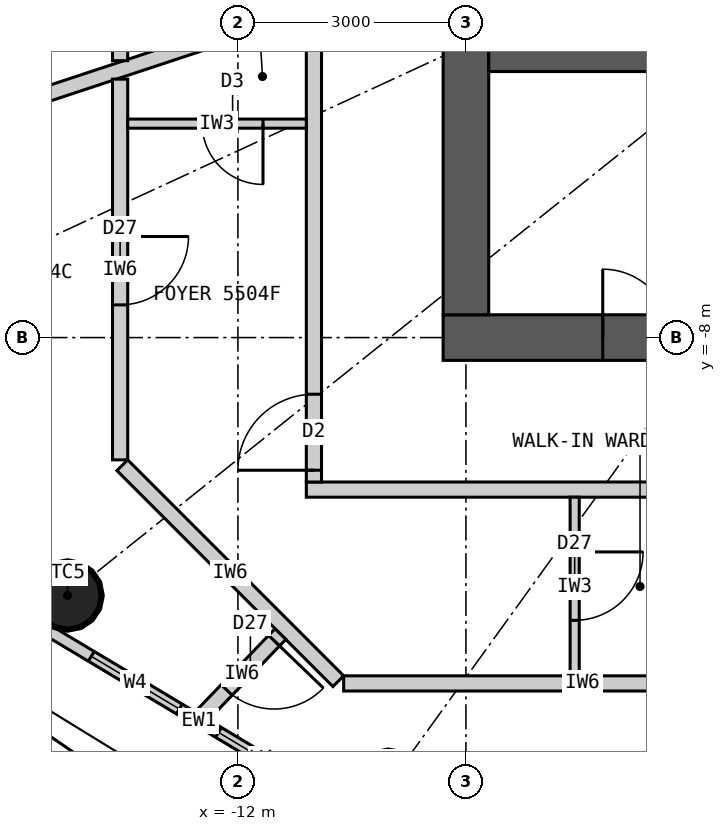
"""IFC4 building model, lengths in metres.
Left out: names, types, materials, properties, quantities, classifications, styles, units other than length and angle.
Written with IfcOpenShell. Run it as: python <this file> out.ifc"""

import sys

from ifc_helpers import new_model, si_unit, direction, frame, frame_2d, origin, origin_2d, place, context, subcontext, project, spatial, rectangle, circle, extrude, element, fill, save


model = new_model("IFC4")
c1 = context("Model", 3, precision=1e-05, world=origin(), true_north=direction((0.0, 1.0)))
c2 = subcontext(c1, "Body", "Model", "MODEL_VIEW")
j1 = project(units=[si_unit("LENGTHUNIT", "METRE"), si_unit("PLANEANGLEUNIT", "RADIAN")], contexts=[c1])
p1 = place(None, origin())
s1 = spatial("IfcSite", under=j1, at=p1, CompositionType="ELEMENT")
p2 = place(p1, origin())
s2 = spatial("IfcBuilding", under=s1, at=p2, CompositionType="ELEMENT")
p3 = place(p2, frame((0.0, 0.0, 206.1)))
s3 = spatial("IfcBuildingStorey", under=s2, at=p3, CompositionType="ELEMENT", Elevation=206.1)
for number, where, z_axis, x_axis in (
    (1, (-14.241, -11.393, 0.0), (0.0, 0.0, 1.0), (1.0, 0.0, 0.0)),
    (2, (-10.019, -13.883, 0.0), (0.0, 0.0, 1.0), (1.0, 0.0, 0.0)),
):
    element("IfcColumn", number, at=place(p3, frame(where, z_axis=z_axis, x_axis=x_axis)), inside=s3, PredefinedType="COLUMN", context=c2, shape_type="SweptSolid", body=[
        extrude(circle(Radius=0.45, at=origin_2d()), origin(), (0.0, 0.0, 1.0), 3.3),
    ])
p4 = place(p3, frame((9.3, -8.0, 0.0), z_axis=(0.0, 0.0, 1.0), x_axis=(-1.0, 0.0, 0.0)))
e3 = element("IfcWall", 3, at=p4, inside=s3, PredefinedType="SHEAR", context=c2, shape_type="SweptSolid", body=[
    extrude(rectangle(XDim=18.6, YDim=0.6, at=frame_2d((9.3, 0.0))), origin(), (0.0, 0.0, 1.0), 3.3),
])
p5 = place(p4, frame((8.0, 0.0, 0.0)))
e4 = element("IfcOpeningElement", 4, at=p5, cuts=e3, PredefinedType="OPENING", context=c2, shape_type="SweptSolid", body=[
    extrude(rectangle(XDim=1.2, YDim=2.2, at=frame_2d((0.6, 1.1))), frame((0.0, 0.31, 0.0), z_axis=(0.0, -1.0, 0.0), x_axis=(1.0, 0.0, 0.0)), (0.0, 0.0, 1.0), 0.62),
])
p6 = place(p4, frame((15.6, 0.0, 0.0)))
e5 = element("IfcOpeningElement", 5, at=p6, cuts=e3, PredefinedType="OPENING", context=c2, shape_type="SweptSolid", body=[
    extrude(rectangle(XDim=0.9, YDim=2.2, at=frame_2d((0.45, 1.1))), frame((0.0, 0.31, 0.0), z_axis=(0.0, -1.0, 0.0), x_axis=(1.0, 0.0, 0.0)), (0.0, 0.0, 1.0), 0.62),
])
p7 = place(p3, frame((-9.0, 7.7, 0.0), z_axis=(0.0, 0.0, 1.0), x_axis=(0.0, -1.0, 0.0)))
e6 = element("IfcWall", 6, at=p7, inside=s3, PredefinedType="SHEAR", context=c2, shape_type="SweptSolid", body=[
    extrude(rectangle(XDim=15.4, YDim=0.6, at=frame_2d((7.7, 0.0))), origin(), (0.0, 0.0, 1.0), 3.3),
])
p8 = place(p7, frame((6.8, 0.0, 0.0)))
e7 = element("IfcOpeningElement", 7, at=p8, cuts=e6, PredefinedType="OPENING", context=c2, shape_type="SweptSolid", body=[
    extrude(rectangle(XDim=1.8, YDim=2.2, at=frame_2d((0.9, 1.1))), frame((0.0, 0.31, 0.0), z_axis=(0.0, -1.0, 0.0), x_axis=(1.0, 0.0, 0.0)), (0.0, 0.0, 1.0), 0.62),
])
p9 = place(p3, frame((-8.7, -4.3, 0.0), z_axis=(0.0, 0.0, 1.0), x_axis=(1.0, 0.0, 0.0)))
e8 = element("IfcWall", 8, at=p9, inside=s3, PredefinedType="SHEAR", context=c2, shape_type="SweptSolid", body=[
    extrude(rectangle(XDim=17.4, YDim=0.4, at=frame_2d((8.7, 0.0))), origin(), (0.0, 0.0, 1.0), 3.3),
])
p10 = place(p3, frame((-14.68, -11.744, 0.0), z_axis=(0.0, 0.0, 1.0), x_axis=(0.85822150553, -0.513279502265, 0.0)))
e9 = element("IfcWall", 9, at=p10, inside=s3, PredefinedType="ELEMENTEDWALL", context=c2, shape_type="SweptSolid", body=[
    extrude(rectangle(XDim=5.05, YDim=0.15, at=frame_2d((2.525, 0.0))), origin(), (0.0, 0.0, 1.0), 3.12),
])
p11 = place(p10, frame((0.875, 0.0, 0.9)))
e10 = element("IfcOpeningElement", 10, at=p11, cuts=e9, PredefinedType="OPENING", context=c2, shape_type="SweptSolid", body=[
    extrude(rectangle(XDim=1.35, YDim=1.9, at=frame_2d((0.675, 0.95))), frame((0.0, 0.085, 0.0), z_axis=(0.0, -1.0, 0.0), x_axis=(1.0, 0.0, 0.0)), (0.0, 0.0, 1.0), 0.17),
])
p12 = place(p10, frame((2.825, 0.0, 0.9)))
e11 = element("IfcOpeningElement", 11, at=p12, cuts=e9, PredefinedType="OPENING", context=c2, shape_type="SweptSolid", body=[
    extrude(rectangle(XDim=1.35, YDim=1.9, at=frame_2d((0.675, 0.95))), frame((0.0, 0.085, 0.0), z_axis=(0.0, -1.0, 0.0), x_axis=(1.0, 0.0, 0.0)), (0.0, 0.0, 1.0), 0.17),
])
p13 = place(p3, frame((11.1, -10.0, 0.0), z_axis=(0.0, 0.0, 1.0), x_axis=(-1.0, 0.0, 0.0)))
e12 = element("IfcWall", 12, at=p13, inside=s3, PredefinedType="PARTITIONING", context=c2, shape_type="SweptSolid", body=[
    extrude(rectangle(XDim=22.2, YDim=0.2, at=frame_2d((11.1, 0.0))), origin(), (0.0, 0.0, 1.0), 3.12),
])
p14 = place(p13, frame((11.36, 0.0, 0.0)))
e13 = element("IfcOpeningElement", 13, at=p14, cuts=e12, PredefinedType="OPENING", context=c2, shape_type="SweptSolid", body=[
    extrude(rectangle(XDim=1.0, YDim=2.2, at=frame_2d((0.5, 1.1))), frame((0.0, 0.11, 0.0), z_axis=(0.0, -1.0, 0.0), x_axis=(1.0, 0.0, 0.0)), (0.0, 0.0, 1.0), 0.22),
])
p15 = place(p13, frame((0.595, 0.0, 0.0)))
e14 = element("IfcOpeningElement", 14, at=p15, cuts=e12, PredefinedType="OPENING", context=c2, shape_type="SweptSolid", body=[
    extrude(rectangle(XDim=1.0, YDim=2.2, at=frame_2d((0.5, 1.1))), frame((0.0, 0.11, 0.0), z_axis=(0.0, -1.0, 0.0), x_axis=(1.0, 0.0, 0.0)), (0.0, 0.0, 1.0), 0.22),
])
p16 = place(p3, frame((-11.0, 9.9, 0.0), z_axis=(0.0, 0.0, 1.0), x_axis=(0.0, -1.0, 0.0)))
e15 = element("IfcWall", 15, at=p16, inside=s3, PredefinedType="PARTITIONING", context=c2, shape_type="SweptSolid", body=[
    extrude(rectangle(XDim=19.8, YDim=0.2, at=frame_2d((9.9, 0.0))), origin(), (0.0, 0.0, 1.0), 3.12),
])
p17 = place(p16, frame((5.075, 0.0, 0.0)))
e16 = element("IfcOpeningElement", 16, at=p17, cuts=e15, PredefinedType="OPENING", context=c2, shape_type="SweptSolid", body=[
    extrude(rectangle(XDim=1.0, YDim=2.2, at=frame_2d((0.5, 1.1))), frame((0.0, 0.11, 0.0), z_axis=(0.0, -1.0, 0.0), x_axis=(1.0, 0.0, 0.0)), (0.0, 0.0, 1.0), 0.22),
])
p18 = place(p16, frame((18.645, 0.0, 0.0)))
e17 = element("IfcOpeningElement", 17, at=p18, cuts=e15, PredefinedType="OPENING", context=c2, shape_type="SweptSolid", body=[
    extrude(rectangle(XDim=1.0, YDim=2.2, at=frame_2d((0.5, 1.1))), frame((0.0, 0.11, 0.0), z_axis=(0.0, -1.0, 0.0), x_axis=(1.0, 0.0, 0.0)), (0.0, 0.0, 1.0), 0.22),
])
p19 = place(p3, frame((-11.1, -3.669, 0.0), z_axis=(0.0, 0.0, 1.0), x_axis=(-0.949476668397, -0.313837627079, 0.0)))
e18 = element("IfcWall", 18, at=p19, inside=s3, PredefinedType="PARTITIONING", context=c2, shape_type="SweptSolid", body=[
    extrude(rectangle(XDim=8.339, YDim=0.2, at=frame_2d((4.169, 0.0))), origin(), (0.0, 0.0, 1.0), 3.12),
])
p20 = place(p3, frame((-13.55, 8.139, 0.0), z_axis=(0.0, 0.0, 1.0), x_axis=(0.0, -1.0, 0.0)))
e19 = element("IfcWall", 19, at=p20, inside=s3, PredefinedType="PARTITIONING", context=c2, shape_type="SweptSolid", body=[
    extrude(rectangle(XDim=12.496, YDim=0.2, at=frame_2d((6.248, 0.0))), origin(), (0.0, 0.0, 1.0), 3.12),
])
p21 = place(p20, frame((7.031, 0.0, 0.0)))
e20 = element("IfcOpeningElement", 20, at=p21, cuts=e19, PredefinedType="OPENING", context=c2, shape_type="SweptSolid", body=[
    extrude(rectangle(XDim=0.9, YDim=2.1, at=frame_2d((0.45, 1.05))), frame((0.0, 0.11, 0.0), z_axis=(0.0, -1.0, 0.0), x_axis=(1.0, 0.0, 0.0)), (0.0, 0.0, 1.0), 0.22),
])
p22 = place(p20, frame((9.373, 0.0, 0.0)))
e21 = element("IfcOpeningElement", 21, at=p22, cuts=e19, PredefinedType="OPENING", context=c2, shape_type="SweptSolid", body=[
    extrude(rectangle(XDim=0.8, YDim=2.1, at=frame_2d((0.4, 1.05))), frame((0.0, 0.11, 0.0), z_axis=(0.0, -1.0, 0.0), x_axis=(1.0, 0.0, 0.0)), (0.0, 0.0, 1.0), 0.22),
])
p23 = place(p20, frame((3.789, 0.0, 0.0)))
e22 = element("IfcOpeningElement", 22, at=p23, cuts=e19, PredefinedType="OPENING", context=c2, shape_type="SweptSolid", body=[
    extrude(rectangle(XDim=0.9, YDim=2.1, at=frame_2d((0.45, 1.05))), frame((0.0, 0.11, 0.0), z_axis=(0.0, -1.0, 0.0), x_axis=(1.0, 0.0, 0.0)), (0.0, 0.0, 1.0), 0.22),
])
p24 = place(p3, frame((-13.55, -4.6, 0.0), z_axis=(0.0, 0.0, 1.0), x_axis=(0.0, -1.0, 0.0)))
e23 = element("IfcWall", 23, at=p24, inside=s3, PredefinedType="PARTITIONING", context=c2, shape_type="SweptSolid", body=[
    extrude(rectangle(XDim=5.009, YDim=0.2, at=frame_2d((2.504, 0.0))), origin(), (0.0, 0.0, 1.0), 3.12),
])
p25 = place(p24, frame((2.07, 0.0, 0.0)))
e24 = element("IfcOpeningElement", 24, at=p25, cuts=e23, PredefinedType="OPENING", context=c2, shape_type="SweptSolid", body=[
    extrude(rectangle(XDim=0.9, YDim=2.1, at=frame_2d((0.45, 1.05))), frame((0.0, 0.11, 0.0), z_axis=(0.0, -1.0, 0.0), x_axis=(1.0, 0.0, 0.0)), (0.0, 0.0, 1.0), 0.22),
])
p26 = place(p3, frame((-13.521, -9.679, 0.0), z_axis=(0.0, 0.0, 1.0), x_axis=(0.707106781187, -0.707106781187, 0.0)))
e25 = element("IfcWall", 25, at=p26, inside=s3, PredefinedType="PARTITIONING", context=c2, shape_type="SweptSolid", body=[
    extrude(rectangle(XDim=4.019, YDim=0.2, at=frame_2d((2.009, 0.0))), origin(), (0.0, 0.0, 1.0), 3.12),
])
p27 = place(p3, frame((-10.609, -12.55, 0.0), z_axis=(0.0, 0.0, 1.0), x_axis=(1.0, 0.0, 0.0)))
e26 = element("IfcWall", 26, at=p27, inside=s3, PredefinedType="PARTITIONING", context=c2, shape_type="SweptSolid", body=[
    extrude(rectangle(XDim=6.284, YDim=0.2, at=frame_2d((3.142, 0.0))), origin(), (0.0, 0.0, 1.0), 3.12),
])
p28 = place(p27, frame((4.944, 0.0, 0.0)))
e27 = element("IfcOpeningElement", 27, at=p28, cuts=e26, PredefinedType="OPENING", context=c2, shape_type="SweptSolid", body=[
    extrude(rectangle(XDim=0.8, YDim=2.1, at=frame_2d((0.4, 1.05))), frame((0.0, 0.11, 0.0), z_axis=(0.0, -1.0, 0.0), x_axis=(1.0, 0.0, 0.0)), (0.0, 0.0, 1.0), 0.22),
])
p29 = place(p3, frame((-11.441, -11.9, 0.0), z_axis=(0.0, 0.0, 1.0), x_axis=(-0.692958717259, -0.720977264672, 0.0)))
e28 = element("IfcWall", 28, at=p29, inside=s3, PredefinedType="PARTITIONING", context=c2, shape_type="SweptSolid", body=[
    extrude(rectangle(XDim=1.464, YDim=0.2, at=frame_2d((0.732, 0.0))), origin(), (0.0, 0.0, 1.0), 3.12),
])
p30 = place(p29, frame((0.12, 0.0, 0.0)))
e29 = element("IfcOpeningElement", 29, at=p30, cuts=e28, PredefinedType="OPENING", context=c2, shape_type="SweptSolid", body=[
    extrude(rectangle(XDim=0.9, YDim=2.1, at=frame_2d((0.45, 1.05))), frame((0.0, 0.11, 0.0), z_axis=(0.0, -1.0, 0.0), x_axis=(1.0, 0.0, 0.0)), (0.0, 0.0, 1.0), 0.22),
])
p31 = place(p3, frame((-11.1, -5.185, 0.0), z_axis=(0.0, 0.0, 1.0), x_axis=(-1.0, 0.0, 0.0)))
e30 = element("IfcWall", 30, at=p31, inside=s3, PredefinedType="PARTITIONING", context=c2, shape_type="SweptSolid", body=[
    extrude(rectangle(XDim=2.35, YDim=0.12, at=frame_2d((1.175, 0.0))), origin(), (0.0, 0.0, 1.0), 3.12),
])
p32 = place(p31, frame((0.57, 0.0, 0.0)))
e31 = element("IfcOpeningElement", 31, at=p32, cuts=e30, PredefinedType="OPENING", context=c2, shape_type="SweptSolid", body=[
    extrude(rectangle(XDim=0.8, YDim=2.1, at=frame_2d((0.4, 1.05))), frame((0.0, 0.07, 0.0), z_axis=(0.0, -1.0, 0.0), x_axis=(1.0, 0.0, 0.0)), (0.0, 0.0, 1.0), 0.14),
])
p33 = place(p3, frame((-7.569, -10.1, 0.0), z_axis=(0.0, 0.0, 1.0), x_axis=(0.0, -1.0, 0.0)))
e32 = element("IfcWall", 32, at=p33, inside=s3, PredefinedType="PARTITIONING", context=c2, shape_type="SweptSolid", body=[
    extrude(rectangle(XDim=2.35, YDim=0.12, at=frame_2d((1.175, 0.0))), origin(), (0.0, 0.0, 1.0), 3.12),
])
p34 = place(p33, frame((0.72, 0.0, 0.0)))
e33 = element("IfcOpeningElement", 33, at=p34, cuts=e32, PredefinedType="OPENING", context=c2, shape_type="SweptSolid", body=[
    extrude(rectangle(XDim=0.9, YDim=2.1, at=frame_2d((0.45, 1.05))), frame((0.0, 0.07, 0.0), z_axis=(0.0, -1.0, 0.0), x_axis=(1.0, 0.0, 0.0)), (0.0, 0.0, 1.0), 0.14),
])
p35 = place(p11, origin())
e34 = element("IfcWindow", 34, at=p35, inside=s3, PartitioningType="SINGLE_PANEL", PredefinedType="WINDOW", context=c2, shape_type="SweptSolid", body=[
    extrude(rectangle(XDim=1.35, YDim=1.9, at=frame_2d((0.675, 0.95))), frame((0.0, 0.03, 0.0), z_axis=(0.0, -1.0, 0.0), x_axis=(1.0, 0.0, 0.0)), (0.0, 0.0, 1.0), 0.06),
])
fill(e10, e34)
p36 = place(p12, origin())
e35 = element("IfcWindow", 35, at=p36, inside=s3, PartitioningType="SINGLE_PANEL", PredefinedType="WINDOW", context=c2, shape_type="SweptSolid", body=[
    extrude(rectangle(XDim=1.35, YDim=1.9, at=frame_2d((0.675, 0.95))), frame((0.0, 0.03, 0.0), z_axis=(0.0, -1.0, 0.0), x_axis=(1.0, 0.0, 0.0)), (0.0, 0.0, 1.0), 0.06),
])
fill(e11, e35)
p37 = place(p18, origin())
e36 = element("IfcDoor", 36, at=p37, inside=s3, OperationType="SINGLE_SWING_RIGHT", PredefinedType="DOOR", context=c2, shape_type="SweptSolid", body=[
    extrude(rectangle(XDim=1.0, YDim=2.2, at=frame_2d((0.5, 1.1))), frame((0.0, 0.025, 0.0), z_axis=(0.0, -1.0, 0.0), x_axis=(1.0, 0.0, 0.0)), (0.0, 0.0, 1.0), 0.05),
])
fill(e17, e36)
p38 = place(p32, origin())
e37 = element("IfcDoor", 37, at=p38, inside=s3, OperationType="SINGLE_SWING_LEFT", PredefinedType="DOOR", context=c2, shape_type="SweptSolid", body=[
    extrude(rectangle(XDim=0.8, YDim=2.1, at=frame_2d((0.4, 1.05))), frame((0.0, 0.025, 0.0), z_axis=(0.0, -1.0, 0.0), x_axis=(1.0, 0.0, 0.0)), (0.0, 0.0, 1.0), 0.05),
])
fill(e31, e37)
p39 = place(p34, origin())
e38 = element("IfcDoor", 38, at=p39, inside=s3, OperationType="SINGLE_SWING_LEFT", PredefinedType="DOOR", context=c2, shape_type="SweptSolid", body=[
    extrude(rectangle(XDim=0.9, YDim=2.1, at=frame_2d((0.45, 1.05))), frame((0.0, 0.025, 0.0), z_axis=(0.0, -1.0, 0.0), x_axis=(1.0, 0.0, 0.0)), (0.0, 0.0, 1.0), 0.05),
])
fill(e33, e38)
p40 = place(p25, origin())
e39 = element("IfcDoor", 39, at=p40, inside=s3, OperationType="SINGLE_SWING_LEFT", PredefinedType="DOOR", context=c2, shape_type="SweptSolid", body=[
    extrude(rectangle(XDim=0.9, YDim=2.1, at=frame_2d((0.45, 1.05))), frame((0.0, 0.025, 0.0), z_axis=(0.0, -1.0, 0.0), x_axis=(1.0, 0.0, 0.0)), (0.0, 0.0, 1.0), 0.05),
])
fill(e24, e39)
p41 = place(p30, origin())
e40 = element("IfcDoor", 40, at=p41, inside=s3, OperationType="SINGLE_SWING_LEFT", PredefinedType="DOOR", context=c2, shape_type="SweptSolid", body=[
    extrude(rectangle(XDim=0.9, YDim=2.1, at=frame_2d((0.45, 1.05))), frame((0.0, 0.025, 0.0), z_axis=(0.0, -1.0, 0.0), x_axis=(1.0, 0.0, 0.0)), (0.0, 0.0, 1.0), 0.05),
])
fill(e29, e40)
p42 = place(p6, origin())
e41 = element("IfcDoor", 41, at=p42, inside=s3, OperationType="SINGLE_SWING_RIGHT", PredefinedType="DOOR", context=c2, shape_type="SweptSolid", body=[
    extrude(rectangle(XDim=0.9, YDim=2.2, at=frame_2d((0.45, 1.1))), frame((0.0, 0.025, 0.0), z_axis=(0.0, -1.0, 0.0), x_axis=(1.0, 0.0, 0.0)), (0.0, 0.0, 1.0), 0.05),
])
fill(e5, e41)
save(model, sys.argv[1])
